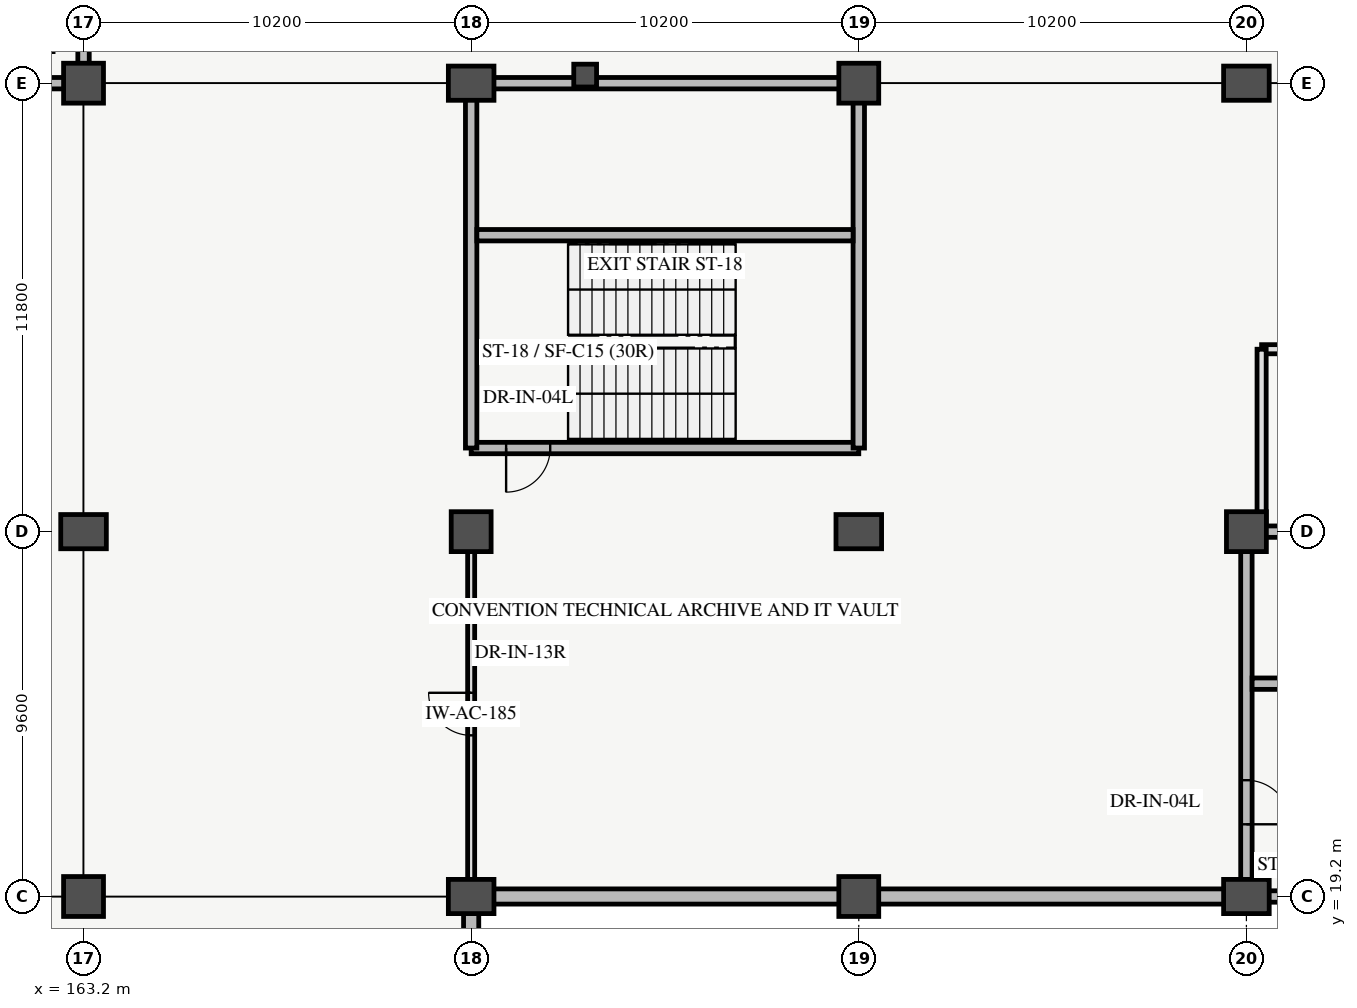
"""IFC4 building model, lengths in metres.
Left out: names, types, materials, properties, quantities, classifications, styles, units other than length and angle.
Written with IfcOpenShell. Run it as: python <this file> out.ifc"""

import sys

from ifc_helpers import new_model, si_unit, direction, frame, frame_2d, origin, origin_2d, place, context, subcontext, project, spatial, rectangle, extrude, element, fill, save


model = new_model("IFC4")
c1 = context("Model", 3, precision=1e-05, world=origin(), true_north=direction((0.0, 1.0)))
c2 = subcontext(c1, "Body", "Model", "MODEL_VIEW")
j1 = project(units=[si_unit("LENGTHUNIT", "METRE"), si_unit("PLANEANGLEUNIT", "RADIAN")], contexts=[c1])
p1 = place(None, origin())
s1 = spatial("IfcSite", under=j1, at=p1, CompositionType="ELEMENT")
p2 = place(p1, origin())
s2 = spatial("IfcBuilding", under=s1, at=p2, CompositionType="ELEMENT")
p3 = place(p2, frame((0.0, 0.0, -4.5)))
s3 = spatial("IfcBuildingStorey", under=s2, at=p3, CompositionType="ELEMENT", Elevation=-4.5)
p4 = place(p3, frame((163.2, 19.2, 0.0), z_axis=(0.0, 0.0, 1.0), x_axis=(1.0, 0.0, 0.0)))
e1 = element("IfcColumn", 1, at=p4, inside=s3, PredefinedType="COLUMN", context=c2, shape_type="SweptSolid", body=[
    extrude(rectangle(XDim=1.05, YDim=1.05, at=origin_2d()), origin(), (0.0, 0.0, 1.0), 4.5),
])
p5 = place(p3, frame((163.2, 28.8, 0.0), z_axis=(0.0, 0.0, 1.0), x_axis=(1.0, 0.0, 0.0)))
e2 = element("IfcColumn", 2, at=p5, inside=s3, PredefinedType="COLUMN", context=c2, shape_type="SweptSolid", body=[
    extrude(rectangle(XDim=1.2, YDim=0.9, at=origin_2d()), origin(), (0.0, 0.0, 1.0), 4.5),
])
p6 = place(p3, frame((163.2, 40.6, 0.0), z_axis=(0.0, 0.0, 1.0), x_axis=(1.0, 0.0, 0.0)))
e3 = element("IfcColumn", 3, at=p6, inside=s3, PredefinedType="COLUMN", context=c2, shape_type="SweptSolid", body=[
    extrude(rectangle(XDim=1.05, YDim=1.05, at=origin_2d()), origin(), (0.0, 0.0, 1.0), 4.5),
])
p7 = place(p3, frame((173.4, 19.2, 0.0), z_axis=(0.0, 0.0, 1.0), x_axis=(1.0, 0.0, 0.0)))
e4 = element("IfcColumn", 4, at=p7, inside=s3, PredefinedType="COLUMN", context=c2, shape_type="SweptSolid", body=[
    extrude(rectangle(XDim=1.2, YDim=0.9, at=origin_2d()), origin(), (0.0, 0.0, 1.0), 4.5),
])
p8 = place(p3, frame((173.4, 28.8, 0.0), z_axis=(0.0, 0.0, 1.0), x_axis=(1.0, 0.0, 0.0)))
e5 = element("IfcColumn", 5, at=p8, inside=s3, PredefinedType="COLUMN", context=c2, shape_type="SweptSolid", body=[
    extrude(rectangle(XDim=1.05, YDim=1.05, at=origin_2d()), origin(), (0.0, 0.0, 1.0), 4.5),
])
p9 = place(p3, frame((173.4, 40.6, 0.0), z_axis=(0.0, 0.0, 1.0), x_axis=(1.0, 0.0, 0.0)))
e6 = element("IfcColumn", 6, at=p9, inside=s3, PredefinedType="COLUMN", context=c2, shape_type="SweptSolid", body=[
    extrude(rectangle(XDim=1.2, YDim=0.9, at=origin_2d()), origin(), (0.0, 0.0, 1.0), 4.5),
])
p10 = place(p3, frame((183.6, 19.2, 0.0), z_axis=(0.0, 0.0, 1.0), x_axis=(1.0, 0.0, 0.0)))
e7 = element("IfcColumn", 7, at=p10, inside=s3, PredefinedType="COLUMN", context=c2, shape_type="SweptSolid", body=[
    extrude(rectangle(XDim=1.05, YDim=1.05, at=origin_2d()), origin(), (0.0, 0.0, 1.0), 4.5),
])
p11 = place(p3, frame((183.6, 28.8, 0.0), z_axis=(0.0, 0.0, 1.0), x_axis=(1.0, 0.0, 0.0)))
e8 = element("IfcColumn", 8, at=p11, inside=s3, PredefinedType="COLUMN", context=c2, shape_type="SweptSolid", body=[
    extrude(rectangle(XDim=1.2, YDim=0.9, at=origin_2d()), origin(), (0.0, 0.0, 1.0), 4.5),
])
p12 = place(p3, frame((183.6, 40.6, 0.0), z_axis=(0.0, 0.0, 1.0), x_axis=(1.0, 0.0, 0.0)))
e9 = element("IfcColumn", 9, at=p12, inside=s3, PredefinedType="COLUMN", context=c2, shape_type="SweptSolid", body=[
    extrude(rectangle(XDim=1.05, YDim=1.05, at=origin_2d()), origin(), (0.0, 0.0, 1.0), 4.5),
])
p13 = place(p3, frame((193.8, 19.2, 0.0), z_axis=(0.0, 0.0, 1.0), x_axis=(1.0, 0.0, 0.0)))
e10 = element("IfcColumn", 10, at=p13, inside=s3, PredefinedType="COLUMN", context=c2, shape_type="SweptSolid", body=[
    extrude(rectangle(XDim=1.2, YDim=0.9, at=origin_2d()), origin(), (0.0, 0.0, 1.0), 4.5),
])
p14 = place(p3, frame((193.8, 28.8, 0.0), z_axis=(0.0, 0.0, 1.0), x_axis=(1.0, 0.0, 0.0)))
e11 = element("IfcColumn", 11, at=p14, inside=s3, PredefinedType="COLUMN", context=c2, shape_type="SweptSolid", body=[
    extrude(rectangle(XDim=1.05, YDim=1.05, at=origin_2d()), origin(), (0.0, 0.0, 1.0), 4.5),
])
p15 = place(p3, frame((193.8, 40.6, 0.0), z_axis=(0.0, 0.0, 1.0), x_axis=(1.0, 0.0, 0.0)))
e12 = element("IfcColumn", 12, at=p15, inside=s3, PredefinedType="COLUMN", context=c2, shape_type="SweptSolid", body=[
    extrude(rectangle(XDim=1.2, YDim=0.9, at=origin_2d()), origin(), (0.0, 0.0, 1.0), 4.5),
])
p16 = place(p3, frame((153.0, 40.6, 0.0), z_axis=(0.0, 0.0, 1.0), x_axis=(1.0, 0.0, 0.0)))
e13 = element("IfcWall", 13, at=p16, inside=s3, PredefinedType="SHEAR", context=c2, shape_type="SweptSolid", body=[
    extrude(rectangle(XDim=10.2, YDim=0.3, at=frame_2d((5.1, 0.0))), origin(), (0.0, 0.0, 1.0), 4.5),
])
p17 = place(p16, frame((7.4, 0.0, 0.0)))
e14 = element("IfcOpeningElement", 14, at=p17, cuts=e13, PredefinedType="OPENING", context=c2, shape_type="SweptSolid", body=[
    extrude(rectangle(XDim=1.2, YDim=2.25, at=frame_2d((0.6, 1.125))), frame((0.0, 0.16, 0.0), z_axis=(0.0, -1.0, 0.0), x_axis=(1.0, 0.0, 0.0)), (0.0, 0.0, 1.0), 0.32),
])
p18 = place(p3, frame((163.2, 40.6, 0.0), z_axis=(0.0, 0.0, 1.0), x_axis=(0.0, 1.0, 0.0)))
e15 = element("IfcWall", 15, at=p18, inside=s3, PredefinedType="SHEAR", context=c2, shape_type="SweptSolid", body=[
    extrude(rectangle(XDim=11.8, YDim=0.3, at=frame_2d((5.9, 0.0))), origin(), (0.0, 0.0, 1.0), 4.5),
])
p19 = place(p3, frame((193.8, 19.2, 0.0), z_axis=(0.0, 0.0, 1.0), x_axis=(1.0, 0.0, 0.0)))
e16 = element("IfcWall", 16, at=p19, inside=s3, PredefinedType="SHEAR", context=c2, shape_type="SweptSolid", body=[
    extrude(rectangle(XDim=10.2, YDim=0.3, at=frame_2d((5.1, 0.0))), origin(), (0.0, 0.0, 1.0), 4.5),
])
p20 = place(p3, frame((193.8, 28.8, 0.0), z_axis=(0.0, 0.0, 1.0), x_axis=(1.0, 0.0, 0.0)))
e17 = element("IfcWall", 17, at=p20, inside=s3, PredefinedType="SHEAR", context=c2, shape_type="SweptSolid", body=[
    extrude(rectangle(XDim=10.2, YDim=0.3, at=frame_2d((5.1, 0.0))), origin(), (0.0, 0.0, 1.0), 4.5),
])
p21 = place(p20, frame((7.4, 0.0, 0.0)))
e18 = element("IfcOpeningElement", 18, at=p21, cuts=e17, PredefinedType="OPENING", context=c2, shape_type="SweptSolid", body=[
    extrude(rectangle(XDim=1.2, YDim=2.25, at=frame_2d((0.6, 1.125))), frame((0.0, 0.16, 0.0), z_axis=(0.0, -1.0, 0.0), x_axis=(1.0, 0.0, 0.0)), (0.0, 0.0, 1.0), 0.32),
])
p22 = place(p3, frame((193.8, 19.2, 0.0), z_axis=(0.0, 0.0, 1.0), x_axis=(0.0, 1.0, 0.0)))
e19 = element("IfcWall", 19, at=p22, inside=s3, PredefinedType="SHEAR", context=c2, shape_type="SweptSolid", body=[
    extrude(rectangle(XDim=9.6, YDim=0.3, at=frame_2d((4.8, 0.0))), origin(), (0.0, 0.0, 1.0), 4.5),
])
p23 = place(p22, frame((1.9, 0.0, 0.0)))
e20 = element("IfcOpeningElement", 20, at=p23, cuts=e19, PredefinedType="OPENING", context=c2, shape_type="SweptSolid", body=[
    extrude(rectangle(XDim=1.16, YDim=2.2, at=frame_2d((0.58, 1.1))), frame((0.0, 0.16, 0.0), z_axis=(0.0, -1.0, 0.0), x_axis=(1.0, 0.0, 0.0)), (0.0, 0.0, 1.0), 0.32),
])
p24 = place(p3, frame((173.4, 3.2, 0.0), z_axis=(0.0, 0.0, 1.0), x_axis=(0.0, 1.0, 0.0)))
e21 = element("IfcWall", 21, at=p24, inside=s3, PredefinedType="SOLIDWALL", context=c2, shape_type="SweptSolid", body=[
    extrude(rectangle(XDim=16.0, YDim=0.4, at=frame_2d((8.0, 0.0))), origin(), (0.0, 0.0, 1.0), 4.1),
])
p25 = place(p3, frame((173.4, 19.2, 0.0), z_axis=(0.0, 0.0, 1.0), x_axis=(1.0, 0.0, 0.0)))
e22 = element("IfcWall", 22, at=p25, inside=s3, PredefinedType="SOLIDWALL", context=c2, shape_type="SweptSolid", body=[
    extrude(rectangle(XDim=20.2, YDim=0.4, at=frame_2d((10.1, 0.0))), origin(), (0.0, 0.0, 1.0), 4.1),
])
p26 = place(p3, frame((176.4, 40.8, 0.0), z_axis=(0.0, 0.0, 1.0), x_axis=(1.0, 0.0, 0.0)))
e23 = element("IfcColumn", 23, at=p26, inside=s3, PredefinedType="COLUMN", context=c2, shape_type="SweptSolid", body=[
    extrude(rectangle(XDim=0.6, YDim=0.6, at=origin_2d()), origin(), (0.0, 0.0, 1.0), 4.1),
])
p27 = place(p3, frame((193.95, 24.8, 0.0), z_axis=(0.0, 0.0, 1.0), x_axis=(1.0, 0.0, 0.0)))
e24 = element("IfcWall", 24, at=p27, inside=s3, PredefinedType="SHEAR", context=c2, shape_type="SweptSolid", body=[
    extrude(rectangle(XDim=9.9, YDim=0.3, at=frame_2d((4.95, 0.0))), origin(), (0.0, 0.0, 1.0), 4.5),
])
p28 = place(p3, frame((173.4, 31.0, 0.0), z_axis=(0.0, 0.0, 1.0), x_axis=(1.0, 0.0, 0.0)))
e25 = element("IfcWall", 25, at=p28, inside=s3, PredefinedType="SHEAR", context=c2, shape_type="SweptSolid", body=[
    extrude(rectangle(XDim=10.2, YDim=0.3, at=frame_2d((5.1, 0.0))), origin(), (0.0, 0.0, 1.0), 4.5),
])
p29 = place(p28, frame((0.92, 0.0, 0.0)))
e26 = element("IfcOpeningElement", 26, at=p29, cuts=e25, PredefinedType="OPENING", context=c2, shape_type="SweptSolid", body=[
    extrude(rectangle(XDim=1.16, YDim=2.2, at=frame_2d((0.58, 1.1))), frame((0.0, 0.16, 0.0), z_axis=(0.0, -1.0, 0.0), x_axis=(1.0, 0.0, 0.0)), (0.0, 0.0, 1.0), 0.32),
])
p30 = place(p3, frame((173.4, 40.6, 0.0), z_axis=(0.0, 0.0, 1.0), x_axis=(1.0, 0.0, 0.0)))
e27 = element("IfcWall", 27, at=p30, inside=s3, PredefinedType="SHEAR", context=c2, shape_type="SweptSolid", body=[
    extrude(rectangle(XDim=10.2, YDim=0.3, at=frame_2d((5.1, 0.0))), origin(), (0.0, 0.0, 1.0), 4.5),
])
for number, where, z_axis, x_axis in (
    (28, (173.4, 31.0, 0.0), (0.0, 0.0, 1.0), (0.0, 1.0, 0.0)),
    (29, (183.6, 31.0, 0.0), (0.0, 0.0, 1.0), (0.0, 1.0, 0.0)),
):
    element("IfcWall", number, at=place(p3, frame(where, z_axis=z_axis, x_axis=x_axis)), inside=s3, PredefinedType="SHEAR", context=c2, shape_type="SweptSolid", body=[
        extrude(rectangle(XDim=9.6, YDim=0.3, at=frame_2d((4.8, 0.0))), origin(), (0.0, 0.0, 1.0), 4.5),
    ])
p31 = place(p3, frame((173.55, 36.6, 0.0), z_axis=(0.0, 0.0, 1.0), x_axis=(1.0, 0.0, 0.0)))
e30 = element("IfcWall", 30, at=p31, inside=s3, PredefinedType="SHEAR", context=c2, shape_type="SweptSolid", body=[
    extrude(rectangle(XDim=9.9, YDim=0.3, at=frame_2d((4.95, 0.0))), origin(), (0.0, 0.0, 1.0), 4.5),
])
p32 = place(p3, frame((194.2, 33.6, 0.0), z_axis=(0.0, 0.0, 1.0), x_axis=(1.0, 0.0, 0.0)))
e31 = element("IfcWall", 31, at=p32, inside=s3, PredefinedType="PARTITIONING", context=c2, shape_type="SweptSolid", body=[
    extrude(rectangle(XDim=9.4, YDim=0.24, at=frame_2d((4.7, 0.0))), origin(), (0.0, 0.0, 1.0), 2.75),
])
p33 = place(p32, frame((3.75, 0.0, 0.0)))
e32 = element("IfcOpeningElement", 32, at=p33, cuts=e31, PredefinedType="OPENING", context=c2, shape_type="SweptSolid", body=[
    extrude(rectangle(XDim=1.9, YDim=2.25, at=frame_2d((0.95, 1.125))), frame((0.0, 0.13, 0.0), z_axis=(0.0, -1.0, 0.0), x_axis=(1.0, 0.0, 0.0)), (0.0, 0.0, 1.0), 0.26),
])
p34 = place(p3, frame((194.2, 29.0, 0.0), z_axis=(0.0, 0.0, 1.0), x_axis=(0.0, 1.0, 0.0)))
e33 = element("IfcWall", 33, at=p34, inside=s3, PredefinedType="PARTITIONING", context=c2, shape_type="SweptSolid", body=[
    extrude(rectangle(XDim=4.6, YDim=0.24, at=frame_2d((2.3, 0.0))), origin(), (0.0, 0.0, 1.0), 2.75),
])
p35 = place(p3, frame((173.4, 19.6, 0.0), z_axis=(0.0, 0.0, 1.0), x_axis=(0.0, 1.0, 0.0)))
e34 = element("IfcWall", 34, at=p35, inside=s3, PredefinedType="PARTITIONING", context=c2, shape_type="SweptSolid", body=[
    extrude(rectangle(XDim=8.8, YDim=0.185, at=frame_2d((4.4, 0.0))), origin(), (0.0, 0.0, 1.0), 2.75),
])
p36 = place(p35, frame((3.84, 0.0, 0.0)))
e35 = element("IfcOpeningElement", 35, at=p36, cuts=e34, PredefinedType="OPENING", context=c2, shape_type="SweptSolid", body=[
    extrude(rectangle(XDim=1.12, YDim=2.18, at=frame_2d((0.56, 1.09))), frame((0.0, 0.103, 0.0), z_axis=(0.0, -1.0, 0.0), x_axis=(1.0, 0.0, 0.0)), (0.0, 0.0, 1.0), 0.205),
])
p37 = place(p23, origin())
e36 = element("IfcDoor", 36, at=p37, inside=s3, OperationType="SINGLE_SWING_LEFT", PredefinedType="DOOR", context=c2, shape_type="SweptSolid", body=[
    extrude(rectangle(XDim=1.16, YDim=2.2, at=frame_2d((0.58, 1.1))), frame((0.0, 0.025, 0.0), z_axis=(0.0, -1.0, 0.0), x_axis=(1.0, 0.0, 0.0)), (0.0, 0.0, 1.0), 0.05),
])
fill(e20, e36)
p38 = place(p29, origin())
e37 = element("IfcDoor", 37, at=p38, inside=s3, OperationType="SINGLE_SWING_LEFT", PredefinedType="DOOR", context=c2, shape_type="SweptSolid", body=[
    extrude(rectangle(XDim=1.16, YDim=2.2, at=frame_2d((0.58, 1.1))), frame((0.0, 0.025, 0.0), z_axis=(0.0, -1.0, 0.0), x_axis=(1.0, 0.0, 0.0)), (0.0, 0.0, 1.0), 0.05),
])
fill(e26, e37)
p39 = place(p36, origin())
e38 = element("IfcDoor", 38, at=p39, inside=s3, OperationType="SINGLE_SWING_RIGHT", PredefinedType="DOOR", context=c2, shape_type="SweptSolid", body=[
    extrude(rectangle(XDim=1.12, YDim=2.18, at=frame_2d((0.56, 1.09))), frame((0.0, 0.025, 0.0), z_axis=(0.0, -1.0, 0.0), x_axis=(1.0, 0.0, 0.0)), (0.0, 0.0, 1.0), 0.05),
])
fill(e35, e38)
save(model, sys.argv[1])
